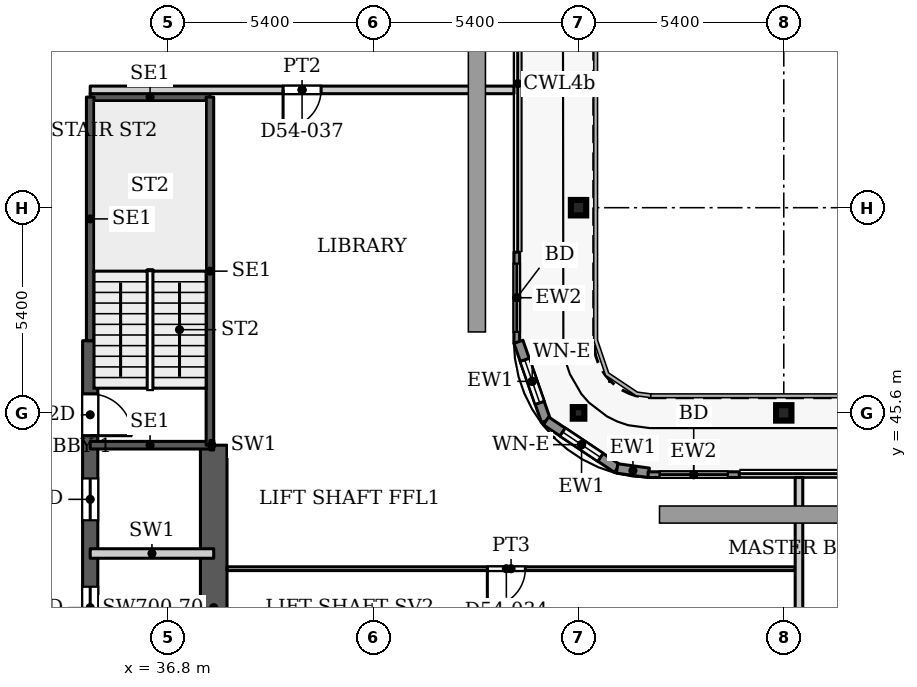
"""IFC4 building model, lengths in metres.
Left out: names, types, materials, properties, quantities, classifications, styles, units other than length and angle.
Written with IfcOpenShell. Run it as: python <this file> out.ifc"""

import sys

from ifc_helpers import new_model, si_unit, direction, frame, frame_2d, origin, origin_2d, place, context, subcontext, project, spatial, rectangle, hollow_rectangle, i_section, extrude, source, transform, mapped, element, fill, save


model = new_model("IFC4")
c1 = context("Model", 3, precision=1e-05, world=origin(), true_north=direction((0.0, 1.0)))
c2 = subcontext(c1, "Body", "Model", "MODEL_VIEW")
j1 = project(units=[si_unit("LENGTHUNIT", "METRE"), si_unit("PLANEANGLEUNIT", "RADIAN")], contexts=[c1])
p1 = place(None, origin())
s1 = spatial("IfcSite", under=j1, at=p1, CompositionType="ELEMENT")
p2 = place(p1, origin())
s2 = spatial("IfcBuilding", under=s1, at=p2, CompositionType="ELEMENT")
p3 = place(p2, frame((0.0, 0.0, 231.8)))
s3 = spatial("IfcBuildingStorey", under=s2, at=p3, CompositionType="ELEMENT", Elevation=231.8)
for number, where, z_axis, x_axis in (
    (1, (53.0, 45.6, 0.0), (0.0, 0.0, 1.0), (1.0, 0.0, 0.0)),
    (2, (47.6, 51.0, 0.0), (0.0, 0.0, 1.0), (1.0, 0.0, 0.0)),
):
    element("IfcColumn", number, at=place(p3, frame(where, z_axis=z_axis, x_axis=x_axis)), inside=s3, PredefinedType="COLUMN", context=c2, shape_type="SweptSolid", body=[
        extrude(i_section(OverallWidth=0.404, OverallDepth=0.407, WebThickness=0.027, FlangeThickness=0.044, FilletRadius=0.012, at=origin_2d()), origin(), (0.0, 0.0, 1.0), 3.9),
    ])
p4 = place(p3, frame((47.6, 45.6, 0.0), z_axis=(0.0, 0.0, 1.0), x_axis=(1.0, 0.0, 0.0)))
e3 = element("IfcColumn", 3, at=p4, inside=s3, PredefinedType="COLUMN", context=c2, shape_type="SweptSolid", body=[
    extrude(hollow_rectangle(XDim=0.305, YDim=0.305, WallThickness=0.016, InnerFilletRadius=0.016, OuterFilletRadius=0.032, at=origin_2d()), origin(), (0.0, 0.0, 1.0), 3.9),
])
p5 = place(p3, frame((34.75, 29.05, 0.0), z_axis=(0.0, 0.0, 1.0), x_axis=(0.0, 1.0, 0.0)))
e4 = element("IfcWall", 4, at=p5, inside=s3, PredefinedType="SHEAR", context=c2, shape_type="SweptSolid", body=[
    extrude(rectangle(XDim=18.45, YDim=0.4, at=frame_2d((9.225, 0.0))), origin(), (0.0, 0.0, 1.0), 3.9),
])
p6 = place(p5, frame((8.025, 0.0, 0.0)))
e5 = element("IfcOpeningElement", 5, at=p6, cuts=e4, PredefinedType="OPENING", context=c2, shape_type="SweptSolid", body=[
    extrude(rectangle(XDim=1.1, YDim=2.2, at=frame_2d((0.55, 1.1))), frame((0.0, 0.21, 0.0), z_axis=(0.0, -1.0, 0.0), x_axis=(1.0, 0.0, 0.0)), (0.0, 0.0, 1.0), 0.42),
])
p7 = place(p5, frame((10.875, 0.0, 0.0)))
e6 = element("IfcOpeningElement", 6, at=p7, cuts=e4, PredefinedType="OPENING", context=c2, shape_type="SweptSolid", body=[
    extrude(rectangle(XDim=1.1, YDim=2.2, at=frame_2d((0.55, 1.1))), frame((0.0, 0.21, 0.0), z_axis=(0.0, -1.0, 0.0), x_axis=(1.0, 0.0, 0.0)), (0.0, 0.0, 1.0), 0.42),
])
p8 = place(p5, frame((13.725, 0.0, 0.0)))
e7 = element("IfcOpeningElement", 7, at=p8, cuts=e4, PredefinedType="OPENING", context=c2, shape_type="SweptSolid", body=[
    extrude(rectangle(XDim=1.1, YDim=2.2, at=frame_2d((0.55, 1.1))), frame((0.0, 0.21, 0.0), z_axis=(0.0, -1.0, 0.0), x_axis=(1.0, 0.0, 0.0)), (0.0, 0.0, 1.0), 0.42),
])
p9 = place(p5, frame((15.95, 0.0, 0.0)))
e8 = element("IfcOpeningElement", 8, at=p9, cuts=e4, PredefinedType="OPENING", context=c2, shape_type="SweptSolid", body=[
    extrude(rectangle(XDim=1.1, YDim=2.2, at=frame_2d((0.55, 1.1))), frame((0.0, 0.21, 0.0), z_axis=(0.0, -1.0, 0.0), x_axis=(1.0, 0.0, 0.0)), (0.0, 0.0, 1.0), 0.42),
])
p10 = place(p3, frame((38.0, 36.2, 0.0), z_axis=(0.0, 0.0, 1.0), x_axis=(0.0, 1.0, 0.0)))
e9 = element("IfcWall", 9, at=p10, inside=s3, PredefinedType="SHEAR", context=c2, shape_type="SweptSolid", body=[
    extrude(rectangle(XDim=8.55, YDim=0.7, at=frame_2d((4.275, 0.0))), origin(), (0.0, 0.0, 1.0), 3.9),
])
p11 = place(p3, frame((45.975, 49.83, 0.0), z_axis=(0.0, 0.0, 1.0), x_axis=(0.0, -1.0, 0.0)))
e10 = element("IfcWall", 10, at=p11, inside=s3, PredefinedType="SOLIDWALL", context=c2, shape_type="SweptSolid", body=[
    extrude(rectangle(XDim=2.4, YDim=0.15, at=frame_2d((1.2, 0.0))), origin(), (0.0, 0.0, 1.0), 3.75),
])
p12 = place(p11, frame((0.3, 0.0, 0.0)))
e11 = element("IfcOpeningElement", 11, at=p12, cuts=e10, PredefinedType="OPENING", context=c2, shape_type="SweptSolid", body=[
    extrude(rectangle(XDim=1.8, YDim=2.4, at=frame_2d((0.9, 1.2))), frame((0.0, 0.085, 0.0), z_axis=(0.0, -1.0, 0.0), x_axis=(1.0, 0.0, 0.0)), (0.0, 0.0, 1.0), 0.17),
])
p13 = place(p3, frame((46.018, 47.471, 0.0), z_axis=(0.0, 0.0, 1.0), x_axis=(0.328791208903, -0.944402637093, 0.0)))
e12 = element("IfcWall", 12, at=p13, inside=s3, PredefinedType="SOLIDWALL", context=c2, shape_type="SweptSolid", body=[
    extrude(rectangle(XDim=2.205, YDim=0.25, at=frame_2d((1.102, 0.0))), origin(), (0.0, 0.0, 1.0), 3.75),
])
p14 = place(p13, frame((0.503, 0.0, 0.6)))
e13 = element("IfcOpeningElement", 13, at=p14, cuts=e12, PredefinedType="OPENING", context=c2, shape_type="SweptSolid", body=[
    extrude(rectangle(XDim=1.2, YDim=2.1, at=frame_2d((0.6, 1.05))), frame((0.0, 0.135, 0.0), z_axis=(0.0, -1.0, 0.0), x_axis=(1.0, 0.0, 0.0)), (0.0, 0.0, 1.0), 0.27),
])
p15 = place(p3, frame((46.743, 45.389, 0.0), z_axis=(0.0, 0.0, 1.0), x_axis=(0.831449265529, -0.555600682912, 0.0)))
e14 = element("IfcWall", 14, at=p15, inside=s3, PredefinedType="SOLIDWALL", context=c2, shape_type="SweptSolid", body=[
    extrude(rectangle(XDim=2.251, YDim=0.25, at=frame_2d((1.126, 0.0))), origin(), (0.0, 0.0, 1.0), 3.75),
])
p16 = place(p15, frame((0.525, 0.0, 0.6)))
e15 = element("IfcOpeningElement", 15, at=p16, cuts=e14, PredefinedType="OPENING", context=c2, shape_type="SweptSolid", body=[
    extrude(rectangle(XDim=1.2, YDim=2.1, at=frame_2d((0.6, 1.05))), frame((0.0, 0.135, 0.0), z_axis=(0.0, -1.0, 0.0), x_axis=(1.0, 0.0, 0.0)), (0.0, 0.0, 1.0), 0.27),
])
p17 = place(p3, frame((48.615, 44.138, 0.0), z_axis=(0.0, 0.0, 1.0), x_axis=(0.990741504246, -0.135761819977, 0.0)))
e16 = element("IfcWall", 16, at=p17, inside=s3, PredefinedType="SOLIDWALL", context=c2, shape_type="SweptSolid", body=[
    extrude(rectangle(XDim=0.84, YDim=0.25, at=frame_2d((0.42, 0.0))), origin(), (0.0, 0.0, 1.0), 3.75),
])
p18 = place(p3, frame((49.43, 43.975, 0.0), z_axis=(0.0, 0.0, 1.0), x_axis=(1.0, 0.0, 0.0)))
e17 = element("IfcWall", 17, at=p18, inside=s3, PredefinedType="SOLIDWALL", context=c2, shape_type="SweptSolid", body=[
    extrude(rectangle(XDim=2.4, YDim=0.15, at=frame_2d((1.2, 0.0))), origin(), (0.0, 0.0, 1.0), 3.75),
])
p19 = place(p18, frame((0.3, 0.0, 0.0)))
e18 = element("IfcOpeningElement", 18, at=p19, cuts=e17, PredefinedType="OPENING", context=c2, shape_type="SweptSolid", body=[
    extrude(rectangle(XDim=1.8, YDim=2.4, at=frame_2d((0.9, 1.2))), frame((0.0, 0.085, 0.0), z_axis=(0.0, -1.0, 0.0), x_axis=(1.0, 0.0, 0.0)), (0.0, 0.0, 1.0), 0.17),
])
for number, where, z_axis, x_axis in (
    (19, (34.75, 44.75, 0.0), (0.0, 0.0, 1.0), (1.0, 0.0, 0.0)),
    (20, (34.75, 53.91, 0.0), (0.0, 0.0, 1.0), (1.0, 0.0, 0.0)),
):
    element("IfcWall", number, at=place(p3, frame(where, z_axis=z_axis, x_axis=x_axis)), inside=s3, PredefinedType="SHEAR", context=c2, shape_type="SweptSolid", body=[
        extrude(rectangle(XDim=3.15, YDim=0.2, at=frame_2d((1.575, 0.0))), origin(), (0.0, 0.0, 1.0), 3.9),
    ])
p20 = place(p3, frame((34.75, 47.5, 0.0), z_axis=(0.0, 0.0, 1.0), x_axis=(0.0, 1.0, 0.0)))
e21 = element("IfcWall", 21, at=p20, inside=s3, PredefinedType="SHEAR", context=c2, shape_type="SweptSolid", body=[
    extrude(rectangle(XDim=6.41, YDim=0.2, at=frame_2d((3.205, 0.0))), origin(), (0.0, 0.0, 1.0), 3.9),
])
p21 = place(p3, frame((37.9, 44.75, 0.0), z_axis=(0.0, 0.0, 1.0), x_axis=(0.0, 1.0, 0.0)))
e22 = element("IfcWall", 22, at=p21, inside=s3, PredefinedType="SHEAR", context=c2, shape_type="SweptSolid", body=[
    extrude(rectangle(XDim=9.16, YDim=0.2, at=frame_2d((4.58, 0.0))), origin(), (0.0, 0.0, 1.0), 3.9),
])
p22 = place(p3, frame((34.75, 41.9, 0.0), z_axis=(0.0, 0.0, 1.0), x_axis=(1.0, 0.0, 0.0)))
e23 = element("IfcWall", 23, at=p22, inside=s3, PredefinedType="PARTITIONING", context=c2, shape_type="SweptSolid", body=[
    extrude(rectangle(XDim=3.25, YDim=0.25, at=frame_2d((1.625, 0.0))), origin(), (0.0, 0.0, 1.0), 3.9),
])
p23 = place(p3, frame((37.9, 44.75, 0.0), z_axis=(0.0, 0.0, 1.0), x_axis=(1.0, 0.0, 0.0)))
e24 = element("IfcWall", 24, at=p23, inside=s3, PredefinedType="PARTITIONING", context=c2, shape_type="SweptSolid", body=[
    extrude(rectangle(XDim=0.1, YDim=0.25, at=frame_2d((0.05, 0.0))), origin(), (0.0, 0.0, 1.0), 3.9),
])
p24 = place(p3, frame((34.75, 54.1, 0.0), z_axis=(0.0, 0.0, 1.0), x_axis=(1.0, 0.0, 0.0)))
e25 = element("IfcWall", 25, at=p24, inside=s3, PredefinedType="PARTITIONING", context=c2, shape_type="SweptSolid", body=[
    extrude(rectangle(XDim=11.15, YDim=0.2, at=frame_2d((5.575, 0.0))), origin(), (0.0, 0.0, 1.0), 3.6),
])
p25 = place(p24, frame((5.075, 0.0, 0.0)))
e26 = element("IfcOpeningElement", 26, at=p25, cuts=e25, PredefinedType="OPENING", context=c2, shape_type="SweptSolid", body=[
    extrude(rectangle(XDim=1.0, YDim=2.1, at=frame_2d((0.5, 1.05))), frame((0.0, 0.11, 0.0), z_axis=(0.0, -1.0, 0.0), x_axis=(1.0, 0.0, 0.0)), (0.0, 0.0, 1.0), 0.22),
])
p26 = place(p3, frame((38.349, 41.5, 0.0), z_axis=(0.0, 0.0, 1.0), x_axis=(1.0, 0.0, 0.0)))
e27 = element("IfcWall", 27, at=p26, inside=s3, PredefinedType="PARTITIONING", context=c2, shape_type="SweptSolid", body=[
    extrude(rectangle(XDim=14.951, YDim=0.1, at=frame_2d((7.476, 0.0))), origin(), (0.0, 0.0, 1.0), 3.6),
])
p27 = place(p26, frame((6.851, 0.0, 0.0)))
e28 = element("IfcOpeningElement", 28, at=p27, cuts=e27, PredefinedType="OPENING", context=c2, shape_type="SweptSolid", body=[
    extrude(rectangle(XDim=1.0, YDim=2.1, at=frame_2d((0.5, 1.05))), frame((0.0, 0.06, 0.0), z_axis=(0.0, -1.0, 0.0), x_axis=(1.0, 0.0, 0.0)), (0.0, 0.0, 1.0), 0.12),
])
p28 = place(p3, frame((53.4, 36.199, 0.0), z_axis=(0.0, 0.0, 1.0), x_axis=(0.0, 1.0, 0.0)))
e29 = element("IfcWall", 29, at=p28, inside=s3, PredefinedType="PARTITIONING", context=c2, shape_type="SweptSolid", body=[
    extrude(rectangle(XDim=7.701, YDim=0.2, at=frame_2d((3.851, 0.0))), origin(), (0.0, 0.0, 1.0), 3.6),
])
m1 = source(origin(), c2, "Body", "SweptSolid", [
    extrude(rectangle(XDim=1.8, YDim=2.4, at=frame_2d((0.9, 1.2))), frame((0.0, 0.025, 0.0), z_axis=(0.0, -1.0, 0.0), x_axis=(1.0, 0.0, 0.0)), (0.0, 0.0, 1.0), 0.05),
])
p29 = place(p12, origin())
e30 = element("IfcDoor", 30, at=p29, inside=s3, OperationType="SLIDING_TO_LEFT", PredefinedType="DOOR", context=c2, shape_type="MappedRepresentation", body=[
    mapped(m1, transform((0.0, 0.0, 0.0), x_axis=(1.0, 0.0, 0.0), y_axis=(0.0, 1.0, 0.0), z_axis=(0.0, 0.0, 1.0), scale=1.0)),
])
fill(e11, e30)
m2 = source(origin(), c2, "Body", "SweptSolid", [
    extrude(rectangle(XDim=1.2, YDim=2.1, at=frame_2d((0.6, 1.05))), frame((0.0, 0.03, 0.0), z_axis=(0.0, -1.0, 0.0), x_axis=(1.0, 0.0, 0.0)), (0.0, 0.0, 1.0), 0.06),
])
p30 = place(p14, origin())
e31 = element("IfcWindow", 31, at=p30, inside=s3, PartitioningType="SINGLE_PANEL", PredefinedType="WINDOW", context=c2, shape_type="MappedRepresentation", body=[
    mapped(m2, transform((0.0, 0.0, 0.0), x_axis=(1.0, 0.0, 0.0), y_axis=(0.0, 1.0, 0.0), z_axis=(0.0, 0.0, 1.0), scale=1.0)),
])
fill(e13, e31)
p31 = place(p16, origin())
e32 = element("IfcWindow", 32, at=p31, inside=s3, PartitioningType="SINGLE_PANEL", PredefinedType="WINDOW", context=c2, shape_type="MappedRepresentation", body=[
    mapped(m2, transform((0.0, 0.0, 0.0), x_axis=(1.0, 0.0, 0.0), y_axis=(0.0, 1.0, 0.0), z_axis=(0.0, 0.0, 1.0), scale=1.0)),
])
fill(e15, e32)
p32 = place(p19, origin())
e33 = element("IfcDoor", 33, at=p32, inside=s3, OperationType="SLIDING_TO_LEFT", PredefinedType="DOOR", context=c2, shape_type="MappedRepresentation", body=[
    mapped(m1, transform((0.0, 0.0, 0.0), x_axis=(1.0, 0.0, 0.0), y_axis=(0.0, 1.0, 0.0), z_axis=(0.0, 0.0, 1.0), scale=1.0)),
])
fill(e18, e33)
m3 = source(origin(), c2, "Body", "SweptSolid", [
    extrude(rectangle(XDim=1.1, YDim=2.2, at=frame_2d((0.55, 1.1))), frame((0.0, 0.025, 0.0), z_axis=(0.0, -1.0, 0.0), x_axis=(1.0, 0.0, 0.0)), (0.0, 0.0, 1.0), 0.05),
])
p33 = place(p7, origin())
e34 = element("IfcDoor", 34, at=p33, inside=s3, OperationType="SLIDING_TO_LEFT", PredefinedType="DOOR", context=c2, shape_type="MappedRepresentation", body=[
    mapped(m3, transform((0.0, 0.0, 0.0), x_axis=(1.0, 0.0, 0.0), y_axis=(0.0, 1.0, 0.0), z_axis=(0.0, 0.0, 1.0), scale=1.0)),
])
fill(e6, e34)
p34 = place(p8, origin())
e35 = element("IfcDoor", 35, at=p34, inside=s3, OperationType="SLIDING_TO_LEFT", PredefinedType="DOOR", context=c2, shape_type="MappedRepresentation", body=[
    mapped(m3, transform((0.0, 0.0, 0.0), x_axis=(1.0, 0.0, 0.0), y_axis=(0.0, 1.0, 0.0), z_axis=(0.0, 0.0, 1.0), scale=1.0)),
])
fill(e7, e35)
m4 = source(origin(), c2, "Body", "SweptSolid", [
    extrude(rectangle(XDim=1.1, YDim=2.2, at=frame_2d((0.55, 1.1))), frame((0.0, 0.025, 0.0), z_axis=(0.0, -1.0, 0.0), x_axis=(1.0, 0.0, 0.0)), (0.0, 0.0, 1.0), 0.05),
])
p35 = place(p9, origin())
e36 = element("IfcDoor", 36, at=p35, inside=s3, OperationType="SINGLE_SWING_RIGHT", PredefinedType="DOOR", context=c2, shape_type="MappedRepresentation", body=[
    mapped(m4, transform((0.0, 0.0, 0.0), x_axis=(1.0, 0.0, 0.0), y_axis=(0.0, 1.0, 0.0), z_axis=(0.0, 0.0, 1.0), scale=1.0)),
])
fill(e8, e36)
m5 = source(origin(), c2, "Body", "SweptSolid", [
    extrude(rectangle(XDim=1.0, YDim=2.1, at=frame_2d((0.5, 1.05))), frame((0.0, 0.025, 0.0), z_axis=(0.0, -1.0, 0.0), x_axis=(1.0, 0.0, 0.0)), (0.0, 0.0, 1.0), 0.05),
])
p36 = place(p27, origin())
e37 = element("IfcDoor", 37, at=p36, inside=s3, OperationType="SINGLE_SWING_RIGHT", PredefinedType="DOOR", context=c2, shape_type="MappedRepresentation", body=[
    mapped(m5, transform((0.0, 0.0, 0.0), x_axis=(1.0, 0.0, 0.0), y_axis=(0.0, 1.0, 0.0), z_axis=(0.0, 0.0, 1.0), scale=1.0)),
])
fill(e28, e37)
m6 = source(origin(), c2, "Body", "SweptSolid", [
    extrude(rectangle(XDim=1.0, YDim=2.1, at=frame_2d((0.5, 1.05))), frame((0.0, 0.025, 0.0), z_axis=(0.0, -1.0, 0.0), x_axis=(1.0, 0.0, 0.0)), (0.0, 0.0, 1.0), 0.05),
])
p37 = place(p25, origin())
e38 = element("IfcDoor", 38, at=p37, inside=s3, OperationType="SINGLE_SWING_RIGHT", PredefinedType="DOOR", context=c2, shape_type="MappedRepresentation", body=[
    mapped(m6, transform((0.0, 0.0, 0.0), x_axis=(1.0, 0.0, 0.0), y_axis=(0.0, 1.0, 0.0), z_axis=(0.0, 0.0, 1.0), scale=1.0)),
])
fill(e26, e38)
save(model, sys.argv[1])
